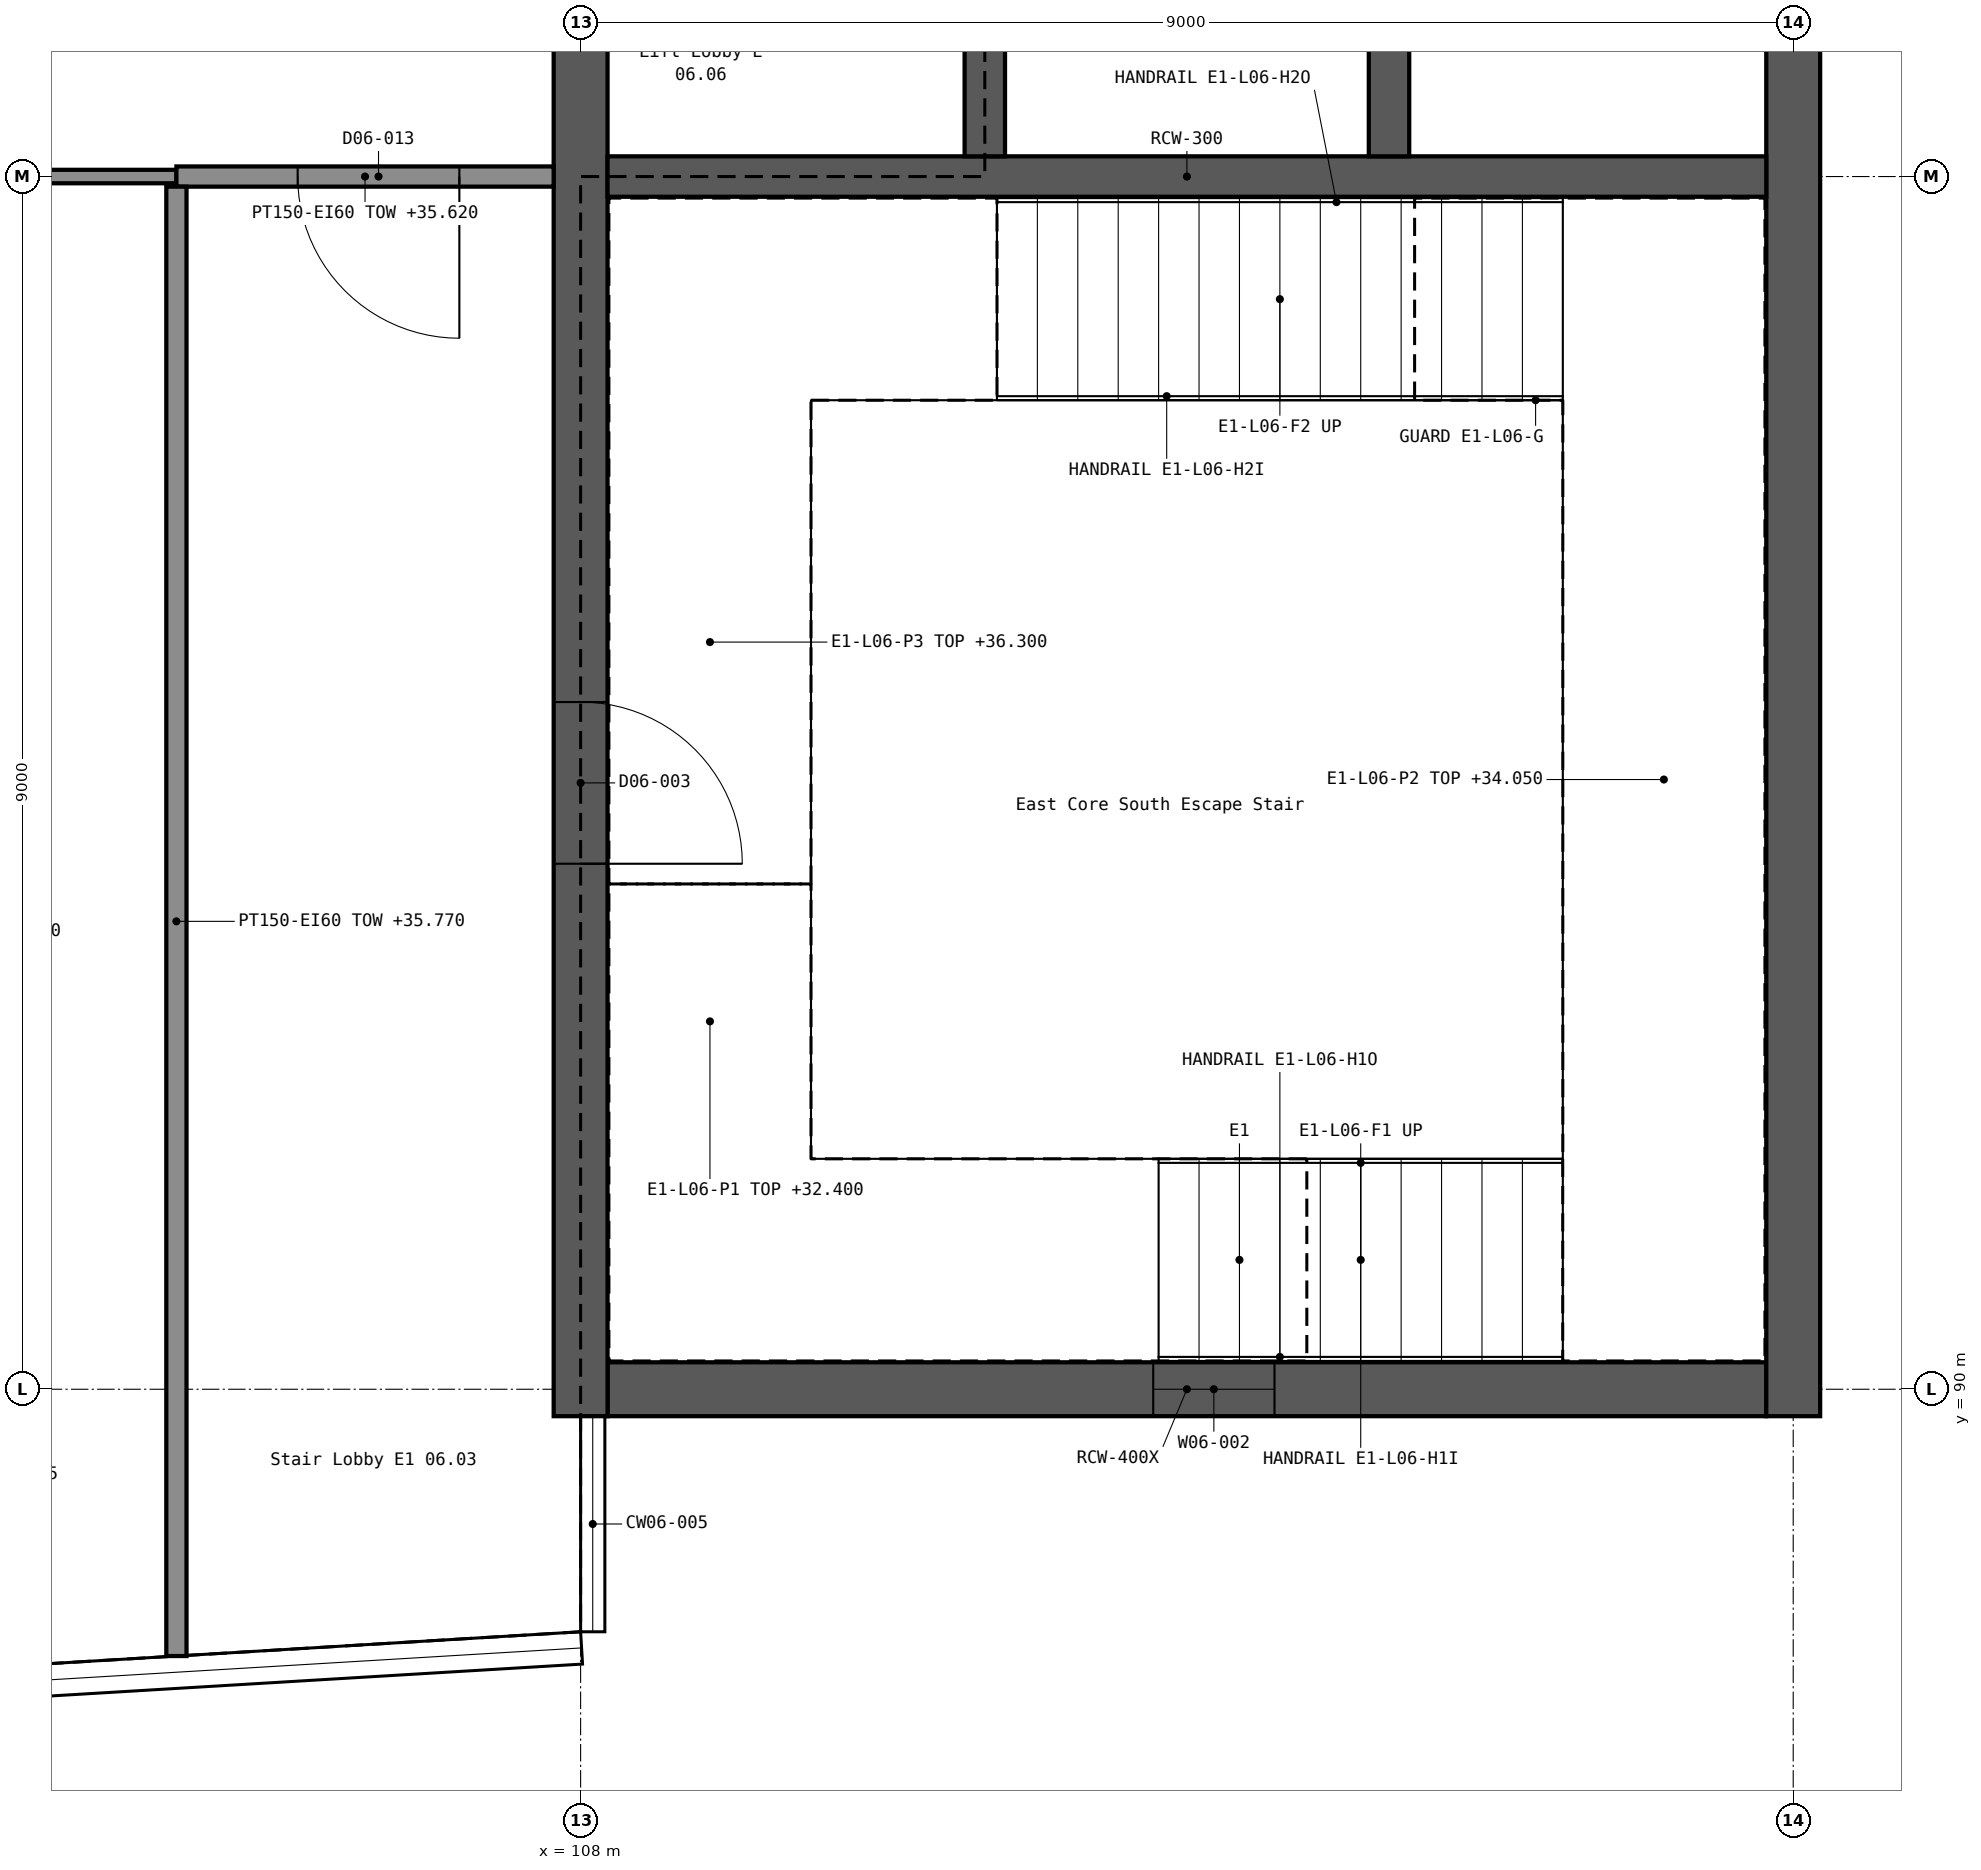
"""IFC4 building model, lengths in metres.
Left out: names, types, materials, properties, quantities, classifications, styles, units other than length and angle.
Written with IfcOpenShell. Run it as: python <this file> out.ifc"""

import sys

from ifc_helpers import new_model, si_unit, direction, frame, frame_2d, origin, place, context, subcontext, project, spatial, rectangle, extrude, element, fill, save


model = new_model("IFC4")
c1 = context("Model", 3, precision=1e-05, world=origin(), true_north=direction((0.0, 1.0)))
c2 = subcontext(c1, "Body", "Model", "MODEL_VIEW")
j1 = project(units=[si_unit("LENGTHUNIT", "METRE"), si_unit("PLANEANGLEUNIT", "RADIAN")], contexts=[c1])
p1 = place(None, origin())
s1 = spatial("IfcSite", under=j1, at=p1, CompositionType="ELEMENT")
p2 = place(p1, origin())
s2 = spatial("IfcBuilding", under=s1, at=p2, CompositionType="ELEMENT")
p3 = place(p2, frame((0.0, 0.0, 32.4)))
s3 = spatial("IfcBuildingStorey", under=s2, at=p3, CompositionType="ELEMENT", Elevation=32.4)
p4 = place(p3, frame((108.2, 90.0, 0.0), z_axis=(0.0, 0.0, 1.0), x_axis=(1.0, 0.0, 0.0)))
e1 = element("IfcWall", 1, at=p4, inside=s3, PredefinedType="SHEAR", context=c2, shape_type="SweptSolid", body=[
    extrude(rectangle(XDim=8.6, YDim=0.4, at=frame_2d((4.3, 0.0))), origin(), (0.0, 0.0, 1.0), 3.9),
])
p5 = place(p4, frame((4.05, 0.0, 1.2)))
e2 = element("IfcOpeningElement", 2, at=p5, cuts=e1, PredefinedType="OPENING", context=c2, shape_type="SweptSolid", body=[
    extrude(rectangle(XDim=0.9, YDim=1.5, at=frame_2d((0.45, 0.75))), frame((0.0, 0.211, 0.0), z_axis=(0.0, -1.0, 0.0), x_axis=(1.0, 0.0, 0.0)), (0.0, 0.0, 1.0), 0.422),
])
p6 = place(p3, frame((108.0, 89.8, 0.0), z_axis=(0.0, 0.0, 1.0), x_axis=(0.0, 1.0, 0.0)))
e3 = element("IfcWall", 3, at=p6, inside=s3, PredefinedType="SHEAR", context=c2, shape_type="SweptSolid", body=[
    extrude(rectangle(XDim=27.4, YDim=0.4, at=frame_2d((13.7, 0.0))), origin(), (0.0, 0.0, 1.0), 3.9),
])
p7 = place(p6, frame((4.1, 0.0, 0.0)))
e4 = element("IfcOpeningElement", 4, at=p7, cuts=e3, PredefinedType="OPENING", context=c2, shape_type="SweptSolid", body=[
    extrude(rectangle(XDim=1.2, YDim=2.1, at=frame_2d((0.6, 1.05))), frame((0.0, 0.211, 0.0), z_axis=(0.0, -1.0, 0.0), x_axis=(1.0, 0.0, 0.0)), (0.0, 0.0, 1.0), 0.422),
])
p8 = place(p6, frame((22.1, 0.0, 0.0)))
e5 = element("IfcOpeningElement", 5, at=p8, cuts=e3, PredefinedType="OPENING", context=c2, shape_type="SweptSolid", body=[
    extrude(rectangle(XDim=1.2, YDim=2.1, at=frame_2d((0.6, 1.05))), frame((0.0, 0.211, 0.0), z_axis=(0.0, -1.0, 0.0), x_axis=(1.0, 0.0, 0.0)), (0.0, 0.0, 1.0), 0.422),
])
p9 = place(p6, frame((12.5, 0.0, 0.0)))
e6 = element("IfcOpeningElement", 6, at=p9, cuts=e3, PredefinedType="OPENING", context=c2, shape_type="SweptSolid", body=[
    extrude(rectangle(XDim=2.0, YDim=2.1, at=frame_2d((1.0, 1.05))), frame((0.0, 0.211, 0.0), z_axis=(0.0, -1.0, 0.0), x_axis=(1.0, 0.0, 0.0)), (0.0, 0.0, 1.0), 0.422),
])
p10 = place(p3, frame((117.0, 89.8, 0.0), z_axis=(0.0, 0.0, 1.0), x_axis=(0.0, 1.0, 0.0)))
e7 = element("IfcWall", 7, at=p10, inside=s3, PredefinedType="SHEAR", context=c2, shape_type="SweptSolid", body=[
    extrude(rectangle(XDim=27.4, YDim=0.4, at=frame_2d((13.7, 0.0))), origin(), (0.0, 0.0, 1.0), 3.9),
])
p11 = place(p3, frame((108.2, 99.0, 0.0), z_axis=(0.0, 0.0, 1.0), x_axis=(1.0, 0.0, 0.0)))
e8 = element("IfcWall", 8, at=p11, inside=s3, PredefinedType="SHEAR", context=c2, shape_type="SweptSolid", body=[
    extrude(rectangle(XDim=8.6, YDim=0.3, at=frame_2d((4.3, 0.0))), origin(), (0.0, 0.0, 1.0), 3.9),
])
p12 = place(p3, frame((111.0, 99.15, 0.0), z_axis=(0.0, 0.0, 1.0), x_axis=(0.0, 1.0, 0.0)))
e9 = element("IfcWall", 9, at=p12, inside=s3, PredefinedType="SHEAR", context=c2, shape_type="SweptSolid", body=[
    extrude(rectangle(XDim=8.7, YDim=0.3, at=frame_2d((4.35, 0.0))), origin(), (0.0, 0.0, 1.0), 3.9),
])
p13 = place(p12, frame((0.8, 0.0, 0.0)))
e10 = element("IfcOpeningElement", 10, at=p13, cuts=e9, PredefinedType="OPENING", context=c2, shape_type="SweptSolid", body=[
    extrude(rectangle(XDim=1.1, YDim=2.1, at=frame_2d((0.55, 1.05))), frame((0.0, 0.161, 0.0), z_axis=(0.0, -1.0, 0.0), x_axis=(1.0, 0.0, 0.0)), (0.0, 0.0, 1.0), 0.322),
])
p14 = place(p12, frame((3.8, 0.0, 0.0)))
e11 = element("IfcOpeningElement", 11, at=p14, cuts=e9, PredefinedType="OPENING", context=c2, shape_type="SweptSolid", body=[
    extrude(rectangle(XDim=1.1, YDim=2.1, at=frame_2d((0.55, 1.05))), frame((0.0, 0.161, 0.0), z_axis=(0.0, -1.0, 0.0), x_axis=(1.0, 0.0, 0.0)), (0.0, 0.0, 1.0), 0.322),
])
p15 = place(p12, frame((6.8, 0.0, 0.0)))
e12 = element("IfcOpeningElement", 12, at=p15, cuts=e9, PredefinedType="OPENING", context=c2, shape_type="SweptSolid", body=[
    extrude(rectangle(XDim=1.1, YDim=2.1, at=frame_2d((0.55, 1.05))), frame((0.0, 0.161, 0.0), z_axis=(0.0, -1.0, 0.0), x_axis=(1.0, 0.0, 0.0)), (0.0, 0.0, 1.0), 0.322),
])
p16 = place(p3, frame((114.0, 99.15, 0.0), z_axis=(0.0, 0.0, 1.0), x_axis=(0.0, 1.0, 0.0)))
e13 = element("IfcWall", 13, at=p16, inside=s3, PredefinedType="SHEAR", context=c2, shape_type="SweptSolid", body=[
    extrude(rectangle(XDim=8.7, YDim=0.3, at=frame_2d((4.35, 0.0))), origin(), (0.0, 0.0, 1.0), 3.9),
])
p17 = place(p3, frame((99.206, 99.0, 0.0), z_axis=(0.0, 0.0, 1.0), x_axis=(1.0, 0.0, 0.0)))
e14 = element("IfcWall", 14, at=p17, inside=s3, PredefinedType="PARTITIONING", context=c2, shape_type="SweptSolid", body=[
    extrude(rectangle(XDim=5.794, YDim=0.1, at=frame_2d((2.897, 0.0))), origin(), (0.0, 0.0, 1.0), 3.22),
])
p18 = place(p17, frame((0.894, 0.0, 0.0)))
e15 = element("IfcOpeningElement", 15, at=p18, cuts=e14, PredefinedType="OPENING", context=c2, shape_type="SweptSolid", body=[
    extrude(rectangle(XDim=0.8, YDim=2.1, at=frame_2d((0.4, 1.05))), frame((0.0, 0.061, 0.0), z_axis=(0.0, -1.0, 0.0), x_axis=(1.0, 0.0, 0.0)), (0.0, 0.0, 1.0), 0.122),
])
p19 = place(p17, frame((3.894, 0.0, 0.0)))
e16 = element("IfcOpeningElement", 16, at=p19, cuts=e14, PredefinedType="OPENING", context=c2, shape_type="SweptSolid", body=[
    extrude(rectangle(XDim=0.8, YDim=2.1, at=frame_2d((0.4, 1.05))), frame((0.0, 0.061, 0.0), z_axis=(0.0, -1.0, 0.0), x_axis=(1.0, 0.0, 0.0)), (0.0, 0.0, 1.0), 0.122),
])
p20 = place(p3, frame((105.0, 99.0, 0.0), z_axis=(0.0, 0.0, 1.0), x_axis=(1.0, 0.0, 0.0)))
e17 = element("IfcWall", 17, at=p20, inside=s3, PredefinedType="PARTITIONING", context=c2, shape_type="SweptSolid", body=[
    extrude(rectangle(XDim=2.8, YDim=0.15, at=frame_2d((1.4, 0.0))), origin(), (0.0, 0.0, 1.0), 3.22),
])
p21 = place(p20, frame((0.9, 0.0, 0.0)))
e18 = element("IfcOpeningElement", 18, at=p21, cuts=e17, PredefinedType="OPENING", context=c2, shape_type="SweptSolid", body=[
    extrude(rectangle(XDim=1.2, YDim=2.1, at=frame_2d((0.6, 1.05))), frame((0.0, 0.086, 0.0), z_axis=(0.0, -1.0, 0.0), x_axis=(1.0, 0.0, 0.0)), (0.0, 0.0, 1.0), 0.172),
])
p22 = place(p3, frame((105.0, 88.02, 0.0), z_axis=(0.0, 0.0, 1.0), x_axis=(0.0, 1.0, 0.0)))
e19 = element("IfcWall", 19, at=p22, inside=s3, PredefinedType="PARTITIONING", context=c2, shape_type="SweptSolid", body=[
    extrude(rectangle(XDim=10.905, YDim=0.15, at=frame_2d((5.453, 0.0))), origin(), (0.0, 0.0, 1.0), 3.37),
])
p23 = place(p5, origin())
e20 = element("IfcWindow", 20, at=p23, inside=s3, PartitioningType="SINGLE_PANEL", PredefinedType="WINDOW", context=c2, shape_type="SweptSolid", body=[
    extrude(rectangle(XDim=0.9, YDim=1.5, at=frame_2d((0.45, 0.75))), frame((0.0, 0.03, 0.0), z_axis=(0.0, -1.0, 0.0), x_axis=(1.0, 0.0, 0.0)), (0.0, 0.0, 1.0), 0.06),
])
fill(e2, e20)
p24 = place(p7, frame((1.2, 0.0, 0.0), z_axis=(0.0, 0.0, 1.0), x_axis=(-1.0, 0.0, 0.0)))
e21 = element("IfcDoor", 21, at=p24, inside=s3, OperationType="SINGLE_SWING_RIGHT", PredefinedType="DOOR", context=c2, shape_type="SweptSolid", body=[
    extrude(rectangle(XDim=1.2, YDim=2.1, at=frame_2d((0.6, 1.05))), frame((0.0, 0.025, 0.0), z_axis=(0.0, -1.0, 0.0), x_axis=(1.0, 0.0, 0.0)), (0.0, 0.0, 1.0), 0.05),
])
fill(e4, e21)
p25 = place(p21, frame((1.2, 0.0, 0.0), z_axis=(0.0, 0.0, 1.0), x_axis=(-1.0, 0.0, 0.0)))
e22 = element("IfcDoor", 22, at=p25, inside=s3, OperationType="SINGLE_SWING_LEFT", PredefinedType="DOOR", context=c2, shape_type="SweptSolid", body=[
    extrude(rectangle(XDim=1.2, YDim=2.1, at=frame_2d((0.6, 1.05))), frame((0.0, 0.025, 0.0), z_axis=(0.0, -1.0, 0.0), x_axis=(1.0, 0.0, 0.0)), (0.0, 0.0, 1.0), 0.05),
])
fill(e18, e22)
save(model, sys.argv[1])
